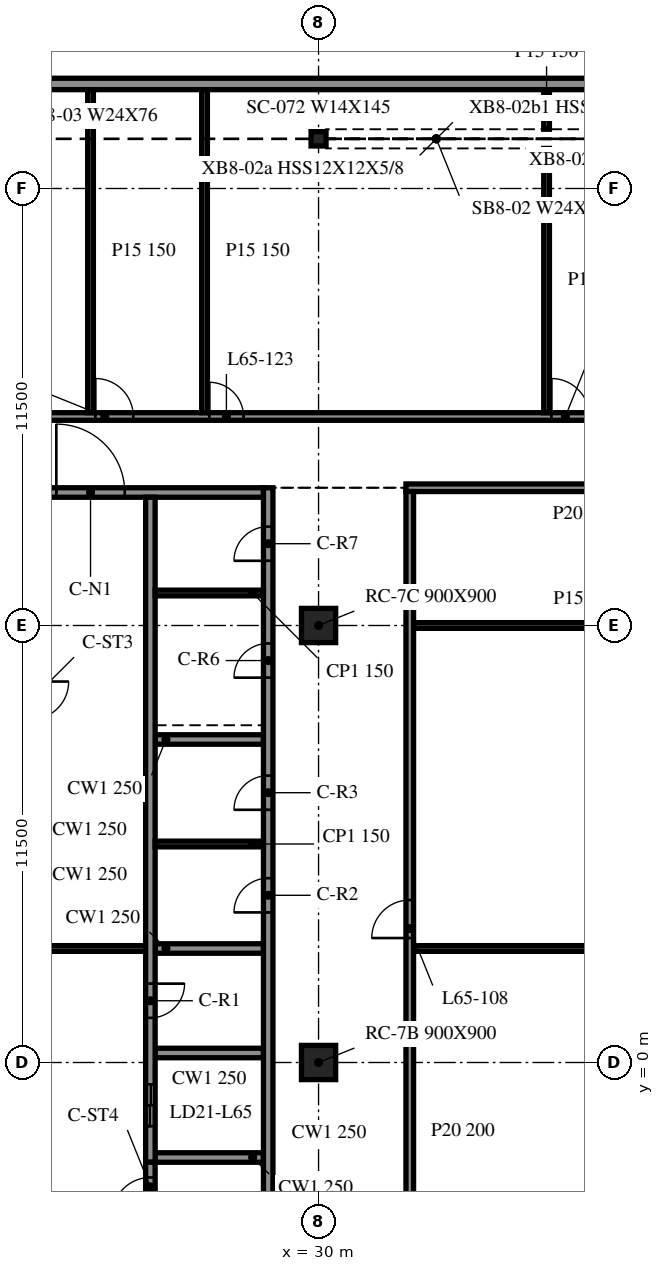
"""IFC4 building model, lengths in metres.
Left out: names, types, materials, properties, quantities, classifications, styles, units other than length and angle.
Written with IfcOpenShell. Run it as: python <this file> out.ifc"""

import sys

from ifc_helpers import new_model, si_unit, direction, frame, frame_2d, origin, origin_2d, place, context, subcontext, project, spatial, rectangle, i_section, extrude, element, fill, save


model = new_model("IFC4")
c1 = context("Model", 3, precision=1e-05, world=origin(), true_north=direction((0.0, 1.0)))
c2 = subcontext(c1, "Body", "Model", "MODEL_VIEW")
j1 = project(units=[si_unit("LENGTHUNIT", "METRE"), si_unit("PLANEANGLEUNIT", "RADIAN")], contexts=[c1])
p1 = place(None, origin())
s1 = spatial("IfcSite", under=j1, at=p1, CompositionType="ELEMENT")
p2 = place(p1, origin())
s2 = spatial("IfcBuilding", under=s1, at=p2, CompositionType="ELEMENT")
p3 = place(p2, frame((0.0, 0.0, 267.1)))
s3 = spatial("IfcBuildingStorey", under=s2, at=p3, CompositionType="ELEMENT", Elevation=267.1)
for number, where, z_axis, x_axis in (
    (1, (30.0, 0.0, -0.34), (0.0, 0.0, 1.0), (1.0, 0.0, 0.0)),
    (2, (30.0, 11.5, -0.34), (0.0, 0.0, 1.0), (1.0, 0.0, 0.0)),
):
    element("IfcColumn", number, at=place(p3, frame(where, z_axis=z_axis, x_axis=x_axis)), inside=s3, PredefinedType="COLUMN", context=c2, shape_type="SweptSolid", body=[
        extrude(rectangle(XDim=0.9, YDim=0.9, at=origin_2d()), origin(), (0.0, 0.0, 1.0), 3.8),
    ])
p4 = place(p3, frame((30.0, 24.307, -0.34), z_axis=(0.0, 0.0, 1.0), x_axis=(1.0, 0.0, 0.0)))
e3 = element("IfcColumn", 3, at=p4, inside=s3, PredefinedType="COLUMN", context=c2, shape_type="SweptSolid", body=[
    extrude(i_section(OverallWidth=0.394, OverallDepth=0.376, WebThickness=0.017, FlangeThickness=0.028, at=origin_2d()), origin(), (0.0, 0.0, 1.0), 3.8),
])
p5 = place(p3, frame((42.0, 25.751, 0.0), z_axis=(0.0, 0.0, 1.0), x_axis=(-1.0, 0.0, 0.0)))
e4 = element("IfcWall", 4, at=p5, inside=s3, PredefinedType="NOTDEFINED", context=c2, shape_type="SweptSolid", body=[
    extrude(rectangle(XDim=84.0, YDim=0.3, at=frame_2d((42.0, 0.0))), origin(), (0.0, 0.0, 1.0), 2.853),
])
p6 = place(p3, frame((28.675, -9.125, 0.0), z_axis=(0.0, 0.0, 1.0), x_axis=(0.0, 1.0, 0.0)))
e5 = element("IfcWall", 5, at=p6, inside=s3, PredefinedType="SOLIDWALL", context=c2, shape_type="SweptSolid", body=[
    extrude(rectangle(XDim=24.25, YDim=0.25, at=frame_2d((12.125, 0.0))), origin(), (0.0, 0.0, 1.0), 3.46),
])
p7 = place(p6, frame((13.075, 0.0, 0.0)))
e6 = element("IfcOpeningElement", 6, at=p7, cuts=e5, PredefinedType="OPENING", context=c2, shape_type="SweptSolid", body=[
    extrude(rectangle(XDim=0.9, YDim=2.1, at=frame_2d((0.45, 1.05))), frame((0.0, 0.135, 0.0), z_axis=(0.0, -1.0, 0.0), x_axis=(1.0, 0.0, 0.0)), (0.0, 0.0, 1.0), 0.27),
])
p8 = place(p6, frame((15.775, 0.0, 0.0)))
e7 = element("IfcOpeningElement", 7, at=p8, cuts=e5, PredefinedType="OPENING", context=c2, shape_type="SweptSolid", body=[
    extrude(rectangle(XDim=0.9, YDim=2.1, at=frame_2d((0.45, 1.05))), frame((0.0, 0.135, 0.0), z_axis=(0.0, -1.0, 0.0), x_axis=(1.0, 0.0, 0.0)), (0.0, 0.0, 1.0), 0.27),
])
p9 = place(p6, frame((19.252, 0.0, 0.0)))
e8 = element("IfcOpeningElement", 8, at=p9, cuts=e5, PredefinedType="OPENING", context=c2, shape_type="SweptSolid", body=[
    extrude(rectangle(XDim=0.9, YDim=2.1, at=frame_2d((0.45, 1.05))), frame((0.0, 0.135, 0.0), z_axis=(0.0, -1.0, 0.0), x_axis=(1.0, 0.0, 0.0)), (0.0, 0.0, 1.0), 0.27),
])
p10 = place(p6, frame((22.327, 0.0, 0.0)))
e9 = element("IfcOpeningElement", 9, at=p10, cuts=e5, PredefinedType="OPENING", context=c2, shape_type="SweptSolid", body=[
    extrude(rectangle(XDim=0.9, YDim=2.1, at=frame_2d((0.45, 1.05))), frame((0.0, 0.135, 0.0), z_axis=(0.0, -1.0, 0.0), x_axis=(1.0, 0.0, 0.0)), (0.0, 0.0, 1.0), 0.27),
])
p11 = place(p3, frame((19.45, 15.0, 0.0), z_axis=(0.0, 0.0, 1.0), x_axis=(1.0, 0.0, 0.0)))
e10 = element("IfcWall", 10, at=p11, inside=s3, PredefinedType="SOLIDWALL", context=c2, shape_type="SweptSolid", body=[
    extrude(rectangle(XDim=9.1, YDim=0.25, at=frame_2d((4.55, 0.0))), origin(), (0.0, 0.0, 1.0), 3.46),
])
p12 = place(p11, frame((3.65, 0.0, 0.0)))
e11 = element("IfcOpeningElement", 11, at=p12, cuts=e10, PredefinedType="OPENING", context=c2, shape_type="SweptSolid", body=[
    extrude(rectangle(XDim=1.8, YDim=2.1, at=frame_2d((0.9, 1.05))), frame((0.0, 0.135, 0.0), z_axis=(0.0, -1.0, 0.0), x_axis=(1.0, 0.0, 0.0)), (0.0, 0.0, 1.0), 0.27),
])
p13 = place(p3, frame((25.575, -8.875, 0.0), z_axis=(0.0, 0.0, 1.0), x_axis=(0.0, 1.0, 0.0)))
e12 = element("IfcWall", 12, at=p13, inside=s3, PredefinedType="SOLIDWALL", context=c2, shape_type="SweptSolid", body=[
    extrude(rectangle(XDim=6.25, YDim=0.25, at=frame_2d((3.125, 0.0))), origin(), (0.0, 0.0, 1.0), 3.46),
])
p14 = place(p13, frame((4.85, 0.0, 0.0)))
e13 = element("IfcOpeningElement", 13, at=p14, cuts=e12, PredefinedType="OPENING", context=c2, shape_type="SweptSolid", body=[
    extrude(rectangle(XDim=1.0, YDim=2.1, at=frame_2d((0.5, 1.05))), frame((0.0, 0.135, 0.0), z_axis=(0.0, -1.0, 0.0), x_axis=(1.0, 0.0, 0.0)), (0.0, 0.0, 1.0), 0.27),
])
p15 = place(p3, frame((25.575, 14.875, 0.0), z_axis=(0.0, 0.0, 1.0), x_axis=(0.0, -1.0, 0.0)))
e14 = element("IfcWall", 14, at=p15, inside=s3, PredefinedType="SOLIDWALL", context=c2, shape_type="SweptSolid", body=[
    extrude(rectangle(XDim=17.5, YDim=0.25, at=frame_2d((8.75, 0.0))), origin(), (0.0, 0.0, 1.0), 3.46),
])
p16 = place(p15, frame((15.45, 0.0, 0.0)))
e15 = element("IfcOpeningElement", 15, at=p16, cuts=e14, PredefinedType="OPENING", context=c2, shape_type="SweptSolid", body=[
    extrude(rectangle(XDim=1.1, YDim=2.1, at=frame_2d((0.55, 1.05))), frame((0.0, 0.135, 0.0), z_axis=(0.0, -1.0, 0.0), x_axis=(1.0, 0.0, 0.0)), (0.0, 0.0, 1.0), 0.27),
])
p17 = place(p15, frame((12.8, 0.0, 0.0)))
e16 = element("IfcOpeningElement", 16, at=p17, cuts=e14, PredefinedType="OPENING", context=c2, shape_type="SweptSolid", body=[
    extrude(rectangle(XDim=0.9, YDim=2.1, at=frame_2d((0.45, 1.05))), frame((0.0, 0.135, 0.0), z_axis=(0.0, -1.0, 0.0), x_axis=(1.0, 0.0, 0.0)), (0.0, 0.0, 1.0), 0.27),
])
for number, where, z_axis, x_axis in (
    (17, (25.7, -2.5, 0.0), (0.0, 0.0, 1.0), (1.0, 0.0, 0.0)),
    (18, (25.7, 0.25, 0.0), (0.0, 0.0, 1.0), (1.0, 0.0, 0.0)),
    (19, (25.7, 3.0, 0.0), (0.0, 0.0, 1.0), (1.0, 0.0, 0.0)),
    (20, (25.7, 8.5, 0.0), (0.0, 0.0, 1.0), (1.0, 0.0, 0.0)),
):
    element("IfcWall", number, at=place(p3, frame(where, z_axis=z_axis, x_axis=x_axis)), inside=s3, PredefinedType="SOLIDWALL", context=c2, shape_type="SweptSolid", body=[
        extrude(rectangle(XDim=2.85, YDim=0.25, at=frame_2d((1.425, 0.0))), origin(), (0.0, 0.0, 1.0), 3.46),
    ])
p18 = place(p3, frame((22.55, 3.0, 0.0), z_axis=(0.0, 0.0, 1.0), x_axis=(1.0, 0.0, 0.0)))
e21 = element("IfcWall", 21, at=p18, inside=s3, PredefinedType="PARTITIONING", context=c2, shape_type="SweptSolid", body=[
    extrude(rectangle(XDim=2.9, YDim=0.15, at=frame_2d((1.45, 0.0))), origin(), (0.0, 0.0, 1.0), 3.46),
])
for number, where, z_axis, x_axis in (
    (22, (25.7, 5.75, 0.0), (0.0, 0.0, 1.0), (1.0, 0.0, 0.0)),
    (23, (25.7, 12.355, 0.0), (0.0, 0.0, 1.0), (1.0, 0.0, 0.0)),
):
    element("IfcWall", number, at=place(p3, frame(where, z_axis=z_axis, x_axis=x_axis)), inside=s3, PredefinedType="PARTITIONING", context=c2, shape_type="SweptSolid", body=[
        extrude(rectangle(XDim=2.85, YDim=0.15, at=frame_2d((1.425, 0.0))), origin(), (0.0, 0.0, 1.0), 3.46),
    ])
p19 = place(p3, frame((32.5, 3.0, 0.0), z_axis=(0.0, 0.0, 1.0), x_axis=(1.0, 0.0, 0.0)))
e24 = element("IfcWall", 24, at=p19, inside=s3, PredefinedType="PARTITIONING", context=c2, shape_type="SweptSolid", body=[
    extrude(rectangle(XDim=15.475, YDim=0.15, at=frame_2d((7.738, 0.0))), origin(), (0.0, 0.0, 1.0), 3.46),
])
p20 = place(p3, frame((32.5, 11.5, 0.0), z_axis=(0.0, 0.0, 1.0), x_axis=(1.0, 0.0, 0.0)))
e25 = element("IfcWall", 25, at=p20, inside=s3, PredefinedType="PARTITIONING", context=c2, shape_type="SweptSolid", body=[
    extrude(rectangle(XDim=9.05, YDim=0.15, at=frame_2d((4.525, 0.0))), origin(), (0.0, 0.0, 1.0), 3.46),
])
p21 = place(p3, frame((32.3, 15.125, 0.0), z_axis=(0.0, 0.0, 1.0), x_axis=(1.0, 0.0, 0.0)))
e26 = element("IfcWall", 26, at=p21, inside=s3, PredefinedType="PARTITIONING", context=c2, shape_type="SweptSolid", body=[
    extrude(rectangle(XDim=15.675, YDim=0.2, at=frame_2d((7.837, 0.0))), origin(), (0.0, 0.0, 1.0), 3.46),
])
p22 = place(p21, frame((7.3, 0.0, 0.0)))
e27 = element("IfcOpeningElement", 27, at=p22, cuts=e26, PredefinedType="OPENING", context=c2, shape_type="SweptSolid", body=[
    extrude(rectangle(XDim=1.0, YDim=2.1, at=frame_2d((0.5, 1.05))), frame((0.0, 0.11, 0.0), z_axis=(0.0, -1.0, 0.0), x_axis=(1.0, 0.0, 0.0)), (0.0, 0.0, 1.0), 0.22),
])
p23 = place(p3, frame((-47.975, 17.0, 0.0), z_axis=(0.0, 0.0, 1.0), x_axis=(1.0, 0.0, 0.0)))
e28 = element("IfcWall", 28, at=p23, inside=s3, PredefinedType="PARTITIONING", context=c2, shape_type="SweptSolid", body=[
    extrude(rectangle(XDim=95.95, YDim=0.2, at=frame_2d((47.975, 0.0))), origin(), (0.0, 0.0, 1.0), 3.46),
])
p24 = place(p23, frame((10.7, 0.0, 0.0)))
e29 = element("IfcOpeningElement", 29, at=p24, cuts=e28, PredefinedType="OPENING", context=c2, shape_type="SweptSolid", body=[
    extrude(rectangle(XDim=0.9, YDim=2.1, at=frame_2d((0.45, 1.05))), frame((0.0, 0.11, 0.0), z_axis=(0.0, -1.0, 0.0), x_axis=(1.0, 0.0, 0.0)), (0.0, 0.0, 1.0), 0.22),
])
p25 = place(p23, frame((13.7, 0.0, 0.0)))
e30 = element("IfcOpeningElement", 30, at=p25, cuts=e28, PredefinedType="OPENING", context=c2, shape_type="SweptSolid", body=[
    extrude(rectangle(XDim=0.9, YDim=2.1, at=frame_2d((0.45, 1.05))), frame((0.0, 0.11, 0.0), z_axis=(0.0, -1.0, 0.0), x_axis=(1.0, 0.0, 0.0)), (0.0, 0.0, 1.0), 0.22),
])
p26 = place(p23, frame((22.5, 0.0, 0.0)))
e31 = element("IfcOpeningElement", 31, at=p26, cuts=e28, PredefinedType="OPENING", context=c2, shape_type="SweptSolid", body=[
    extrude(rectangle(XDim=1.0, YDim=2.1, at=frame_2d((0.5, 1.05))), frame((0.0, 0.11, 0.0), z_axis=(0.0, -1.0, 0.0), x_axis=(1.0, 0.0, 0.0)), (0.0, 0.0, 1.0), 0.22),
])
p27 = place(p23, frame((28.5, 0.0, 0.0)))
e32 = element("IfcOpeningElement", 32, at=p27, cuts=e28, PredefinedType="OPENING", context=c2, shape_type="SweptSolid", body=[
    extrude(rectangle(XDim=1.0, YDim=2.1, at=frame_2d((0.5, 1.05))), frame((0.0, 0.11, 0.0), z_axis=(0.0, -1.0, 0.0), x_axis=(1.0, 0.0, 0.0)), (0.0, 0.0, 1.0), 0.22),
])
p28 = place(p23, frame((40.7, 0.0, 0.0)))
e33 = element("IfcOpeningElement", 33, at=p28, cuts=e28, PredefinedType="OPENING", context=c2, shape_type="SweptSolid", body=[
    extrude(rectangle(XDim=0.9, YDim=2.1, at=frame_2d((0.45, 1.05))), frame((0.0, 0.11, 0.0), z_axis=(0.0, -1.0, 0.0), x_axis=(1.0, 0.0, 0.0)), (0.0, 0.0, 1.0), 0.22),
])
p29 = place(p23, frame((43.5, 0.0, 0.0)))
e34 = element("IfcOpeningElement", 34, at=p29, cuts=e28, PredefinedType="OPENING", context=c2, shape_type="SweptSolid", body=[
    extrude(rectangle(XDim=1.0, YDim=2.1, at=frame_2d((0.5, 1.05))), frame((0.0, 0.11, 0.0), z_axis=(0.0, -1.0, 0.0), x_axis=(1.0, 0.0, 0.0)), (0.0, 0.0, 1.0), 0.22),
])
p30 = place(p23, frame((47.3, 0.0, 0.0)))
e35 = element("IfcOpeningElement", 35, at=p30, cuts=e28, PredefinedType="OPENING", context=c2, shape_type="SweptSolid", body=[
    extrude(rectangle(XDim=0.9, YDim=2.1, at=frame_2d((0.45, 1.05))), frame((0.0, 0.11, 0.0), z_axis=(0.0, -1.0, 0.0), x_axis=(1.0, 0.0, 0.0)), (0.0, 0.0, 1.0), 0.22),
])
p31 = place(p23, frame((54.1, 0.0, 0.0)))
e36 = element("IfcOpeningElement", 36, at=p31, cuts=e28, PredefinedType="OPENING", context=c2, shape_type="SweptSolid", body=[
    extrude(rectangle(XDim=0.9, YDim=2.1, at=frame_2d((0.45, 1.05))), frame((0.0, 0.11, 0.0), z_axis=(0.0, -1.0, 0.0), x_axis=(1.0, 0.0, 0.0)), (0.0, 0.0, 1.0), 0.22),
])
p32 = place(p23, frame((60.1, 0.0, 0.0)))
e37 = element("IfcOpeningElement", 37, at=p32, cuts=e28, PredefinedType="OPENING", context=c2, shape_type="SweptSolid", body=[
    extrude(rectangle(XDim=1.0, YDim=2.1, at=frame_2d((0.5, 1.05))), frame((0.0, 0.11, 0.0), z_axis=(0.0, -1.0, 0.0), x_axis=(1.0, 0.0, 0.0)), (0.0, 0.0, 1.0), 0.22),
])
p33 = place(p23, frame((72.1, 0.0, 0.0)))
e38 = element("IfcOpeningElement", 38, at=p33, cuts=e28, PredefinedType="OPENING", context=c2, shape_type="SweptSolid", body=[
    extrude(rectangle(XDim=1.0, YDim=2.1, at=frame_2d((0.5, 1.05))), frame((0.0, 0.11, 0.0), z_axis=(0.0, -1.0, 0.0), x_axis=(1.0, 0.0, 0.0)), (0.0, 0.0, 1.0), 0.22),
])
p34 = place(p23, frame((75.1, 0.0, 0.0)))
e39 = element("IfcOpeningElement", 39, at=p34, cuts=e28, PredefinedType="OPENING", context=c2, shape_type="SweptSolid", body=[
    extrude(rectangle(XDim=0.9, YDim=2.1, at=frame_2d((0.45, 1.05))), frame((0.0, 0.11, 0.0), z_axis=(0.0, -1.0, 0.0), x_axis=(1.0, 0.0, 0.0)), (0.0, 0.0, 1.0), 0.22),
])
p35 = place(p23, frame((84.1, 0.0, 0.0)))
e40 = element("IfcOpeningElement", 40, at=p35, cuts=e28, PredefinedType="OPENING", context=c2, shape_type="SweptSolid", body=[
    extrude(rectangle(XDim=1.0, YDim=2.1, at=frame_2d((0.5, 1.05))), frame((0.0, 0.11, 0.0), z_axis=(0.0, -1.0, 0.0), x_axis=(1.0, 0.0, 0.0)), (0.0, 0.0, 1.0), 0.22),
])
p36 = place(p23, frame((90.1, 0.0, 0.0)))
e41 = element("IfcOpeningElement", 41, at=p36, cuts=e28, PredefinedType="OPENING", context=c2, shape_type="SweptSolid", body=[
    extrude(rectangle(XDim=0.9, YDim=2.1, at=frame_2d((0.45, 1.05))), frame((0.0, 0.11, 0.0), z_axis=(0.0, -1.0, 0.0), x_axis=(1.0, 0.0, 0.0)), (0.0, 0.0, 1.0), 0.22),
])
for number, where, z_axis, x_axis in (
    (42, (24.0, 17.1, 0.0), (0.0, 0.0, 1.0), (0.0, 1.0, 0.0)),
    (43, (27.0, 17.1, 0.0), (0.0, 0.0, 1.0), (0.0, 1.0, 0.0)),
):
    element("IfcWall", number, at=place(p3, frame(where, z_axis=z_axis, x_axis=x_axis)), inside=s3, PredefinedType="PARTITIONING", context=c2, shape_type="SweptSolid", body=[
        extrude(rectangle(XDim=8.501, YDim=0.15, at=frame_2d((4.25, 0.0))), origin(), (0.0, 0.0, 1.0), 3.46),
    ])
p37 = place(p3, frame((32.4, -9.025, 0.0), z_axis=(0.0, 0.0, 1.0), x_axis=(0.0, 1.0, 0.0)))
e44 = element("IfcWall", 44, at=p37, inside=s3, PredefinedType="PARTITIONING", context=c2, shape_type="SweptSolid", body=[
    extrude(rectangle(XDim=24.05, YDim=0.2, at=frame_2d((12.025, 0.0))), origin(), (0.0, 0.0, 1.0), 3.46),
])
p38 = place(p37, frame((12.3, 0.0, 0.0)))
e45 = element("IfcOpeningElement", 45, at=p38, cuts=e44, PredefinedType="OPENING", context=c2, shape_type="SweptSolid", body=[
    extrude(rectangle(XDim=1.0, YDim=2.1, at=frame_2d((0.5, 1.05))), frame((0.0, 0.11, 0.0), z_axis=(0.0, -1.0, 0.0), x_axis=(1.0, 0.0, 0.0)), (0.0, 0.0, 1.0), 0.22),
])
p39 = place(p3, frame((36.0, 17.1, 0.0), z_axis=(0.0, 0.0, 1.0), x_axis=(0.0, 1.0, 0.0)))
e46 = element("IfcWall", 46, at=p39, inside=s3, PredefinedType="PARTITIONING", context=c2, shape_type="SweptSolid", body=[
    extrude(rectangle(XDim=6.955, YDim=0.15, at=frame_2d((3.477, 0.0))), origin(), (0.0, 0.0, 1.0), 3.46),
])
p40 = place(p3, frame((36.0, 24.559, 0.0), z_axis=(0.0, 0.0, 1.0), x_axis=(0.0, 1.0, 0.0)))
e47 = element("IfcWall", 47, at=p40, inside=s3, PredefinedType="PARTITIONING", context=c2, shape_type="SweptSolid", body=[
    extrude(rectangle(XDim=1.042, YDim=0.15, at=frame_2d((0.521, 0.0))), origin(), (0.0, 0.0, 1.0), 3.46),
])
p41 = place(p12, origin())
e48 = element("IfcDoor", 48, at=p41, inside=s3, OperationType="DOUBLE_DOOR_SINGLE_SWING", PredefinedType="DOOR", context=c2, shape_type="SweptSolid", body=[
    extrude(rectangle(XDim=1.8, YDim=2.1, at=frame_2d((0.9, 1.05))), frame((0.0, 0.025, 0.0), z_axis=(0.0, -1.0, 0.0), x_axis=(1.0, 0.0, 0.0)), (0.0, 0.0, 1.0), 0.05),
])
fill(e11, e48)
p42 = place(p16, origin())
e49 = element("IfcDoor", 49, at=p42, inside=s3, OperationType="DOUBLE_DOOR_SLIDING", PredefinedType="DOOR", context=c2, shape_type="SweptSolid", body=[
    extrude(rectangle(XDim=1.1, YDim=2.1, at=frame_2d((0.55, 1.05))), frame((0.0, 0.025, 0.0), z_axis=(0.0, -1.0, 0.0), x_axis=(1.0, 0.0, 0.0)), (0.0, 0.0, 1.0), 0.05),
])
fill(e15, e49)
p43 = place(p17, origin())
e50 = element("IfcDoor", 50, at=p43, inside=s3, OperationType="SINGLE_SWING_LEFT", PredefinedType="DOOR", context=c2, shape_type="SweptSolid", body=[
    extrude(rectangle(XDim=0.9, YDim=2.1, at=frame_2d((0.45, 1.05))), frame((0.0, 0.025, 0.0), z_axis=(0.0, -1.0, 0.0), x_axis=(1.0, 0.0, 0.0)), (0.0, 0.0, 1.0), 0.05),
])
fill(e16, e50)
p44 = place(p7, origin())
e51 = element("IfcDoor", 51, at=p44, inside=s3, OperationType="SINGLE_SWING_RIGHT", PredefinedType="DOOR", context=c2, shape_type="SweptSolid", body=[
    extrude(rectangle(XDim=0.9, YDim=2.1, at=frame_2d((0.45, 1.05))), frame((0.0, 0.025, 0.0), z_axis=(0.0, -1.0, 0.0), x_axis=(1.0, 0.0, 0.0)), (0.0, 0.0, 1.0), 0.05),
])
fill(e6, e51)
p45 = place(p8, origin())
e52 = element("IfcDoor", 52, at=p45, inside=s3, OperationType="SINGLE_SWING_LEFT", PredefinedType="DOOR", context=c2, shape_type="SweptSolid", body=[
    extrude(rectangle(XDim=0.9, YDim=2.1, at=frame_2d((0.45, 1.05))), frame((0.0, 0.025, 0.0), z_axis=(0.0, -1.0, 0.0), x_axis=(1.0, 0.0, 0.0)), (0.0, 0.0, 1.0), 0.05),
])
fill(e7, e52)
p46 = place(p9, origin())
e53 = element("IfcDoor", 53, at=p46, inside=s3, OperationType="SINGLE_SWING_RIGHT", PredefinedType="DOOR", context=c2, shape_type="SweptSolid", body=[
    extrude(rectangle(XDim=0.9, YDim=2.1, at=frame_2d((0.45, 1.05))), frame((0.0, 0.025, 0.0), z_axis=(0.0, -1.0, 0.0), x_axis=(1.0, 0.0, 0.0)), (0.0, 0.0, 1.0), 0.05),
])
fill(e8, e53)
p47 = place(p10, origin())
e54 = element("IfcDoor", 54, at=p47, inside=s3, OperationType="SINGLE_SWING_LEFT", PredefinedType="DOOR", context=c2, shape_type="SweptSolid", body=[
    extrude(rectangle(XDim=0.9, YDim=2.1, at=frame_2d((0.45, 1.05))), frame((0.0, 0.025, 0.0), z_axis=(0.0, -1.0, 0.0), x_axis=(1.0, 0.0, 0.0)), (0.0, 0.0, 1.0), 0.05),
])
fill(e9, e54)
p48 = place(p14, origin())
e55 = element("IfcDoor", 55, at=p48, inside=s3, OperationType="SINGLE_SWING_LEFT", PredefinedType="DOOR", context=c2, shape_type="SweptSolid", body=[
    extrude(rectangle(XDim=1.0, YDim=2.1, at=frame_2d((0.5, 1.05))), frame((0.0, 0.025, 0.0), z_axis=(0.0, -1.0, 0.0), x_axis=(1.0, 0.0, 0.0)), (0.0, 0.0, 1.0), 0.05),
])
fill(e13, e55)
p49 = place(p38, origin())
e56 = element("IfcDoor", 56, at=p49, inside=s3, OperationType="SINGLE_SWING_LEFT", PredefinedType="DOOR", context=c2, shape_type="SweptSolid", body=[
    extrude(rectangle(XDim=1.0, YDim=2.1, at=frame_2d((0.5, 1.05))), frame((0.0, 0.025, 0.0), z_axis=(0.0, -1.0, 0.0), x_axis=(1.0, 0.0, 0.0)), (0.0, 0.0, 1.0), 0.05),
])
fill(e45, e56)
p50 = place(p33, origin())
e57 = element("IfcDoor", 57, at=p50, inside=s3, OperationType="SINGLE_SWING_RIGHT", PredefinedType="DOOR", context=c2, shape_type="SweptSolid", body=[
    extrude(rectangle(XDim=1.0, YDim=2.1, at=frame_2d((0.5, 1.05))), frame((0.0, 0.025, 0.0), z_axis=(0.0, -1.0, 0.0), x_axis=(1.0, 0.0, 0.0)), (0.0, 0.0, 1.0), 0.05),
])
fill(e38, e57)
p51 = place(p34, origin())
e58 = element("IfcDoor", 58, at=p51, inside=s3, OperationType="SINGLE_SWING_RIGHT", PredefinedType="DOOR", context=c2, shape_type="SweptSolid", body=[
    extrude(rectangle(XDim=0.9, YDim=2.1, at=frame_2d((0.45, 1.05))), frame((0.0, 0.025, 0.0), z_axis=(0.0, -1.0, 0.0), x_axis=(1.0, 0.0, 0.0)), (0.0, 0.0, 1.0), 0.05),
])
fill(e39, e58)
p52 = place(p35, origin())
e59 = element("IfcDoor", 59, at=p52, inside=s3, OperationType="SINGLE_SWING_RIGHT", PredefinedType="DOOR", context=c2, shape_type="SweptSolid", body=[
    extrude(rectangle(XDim=1.0, YDim=2.1, at=frame_2d((0.5, 1.05))), frame((0.0, 0.025, 0.0), z_axis=(0.0, -1.0, 0.0), x_axis=(1.0, 0.0, 0.0)), (0.0, 0.0, 1.0), 0.05),
])
fill(e40, e59)
save(model, sys.argv[1])
